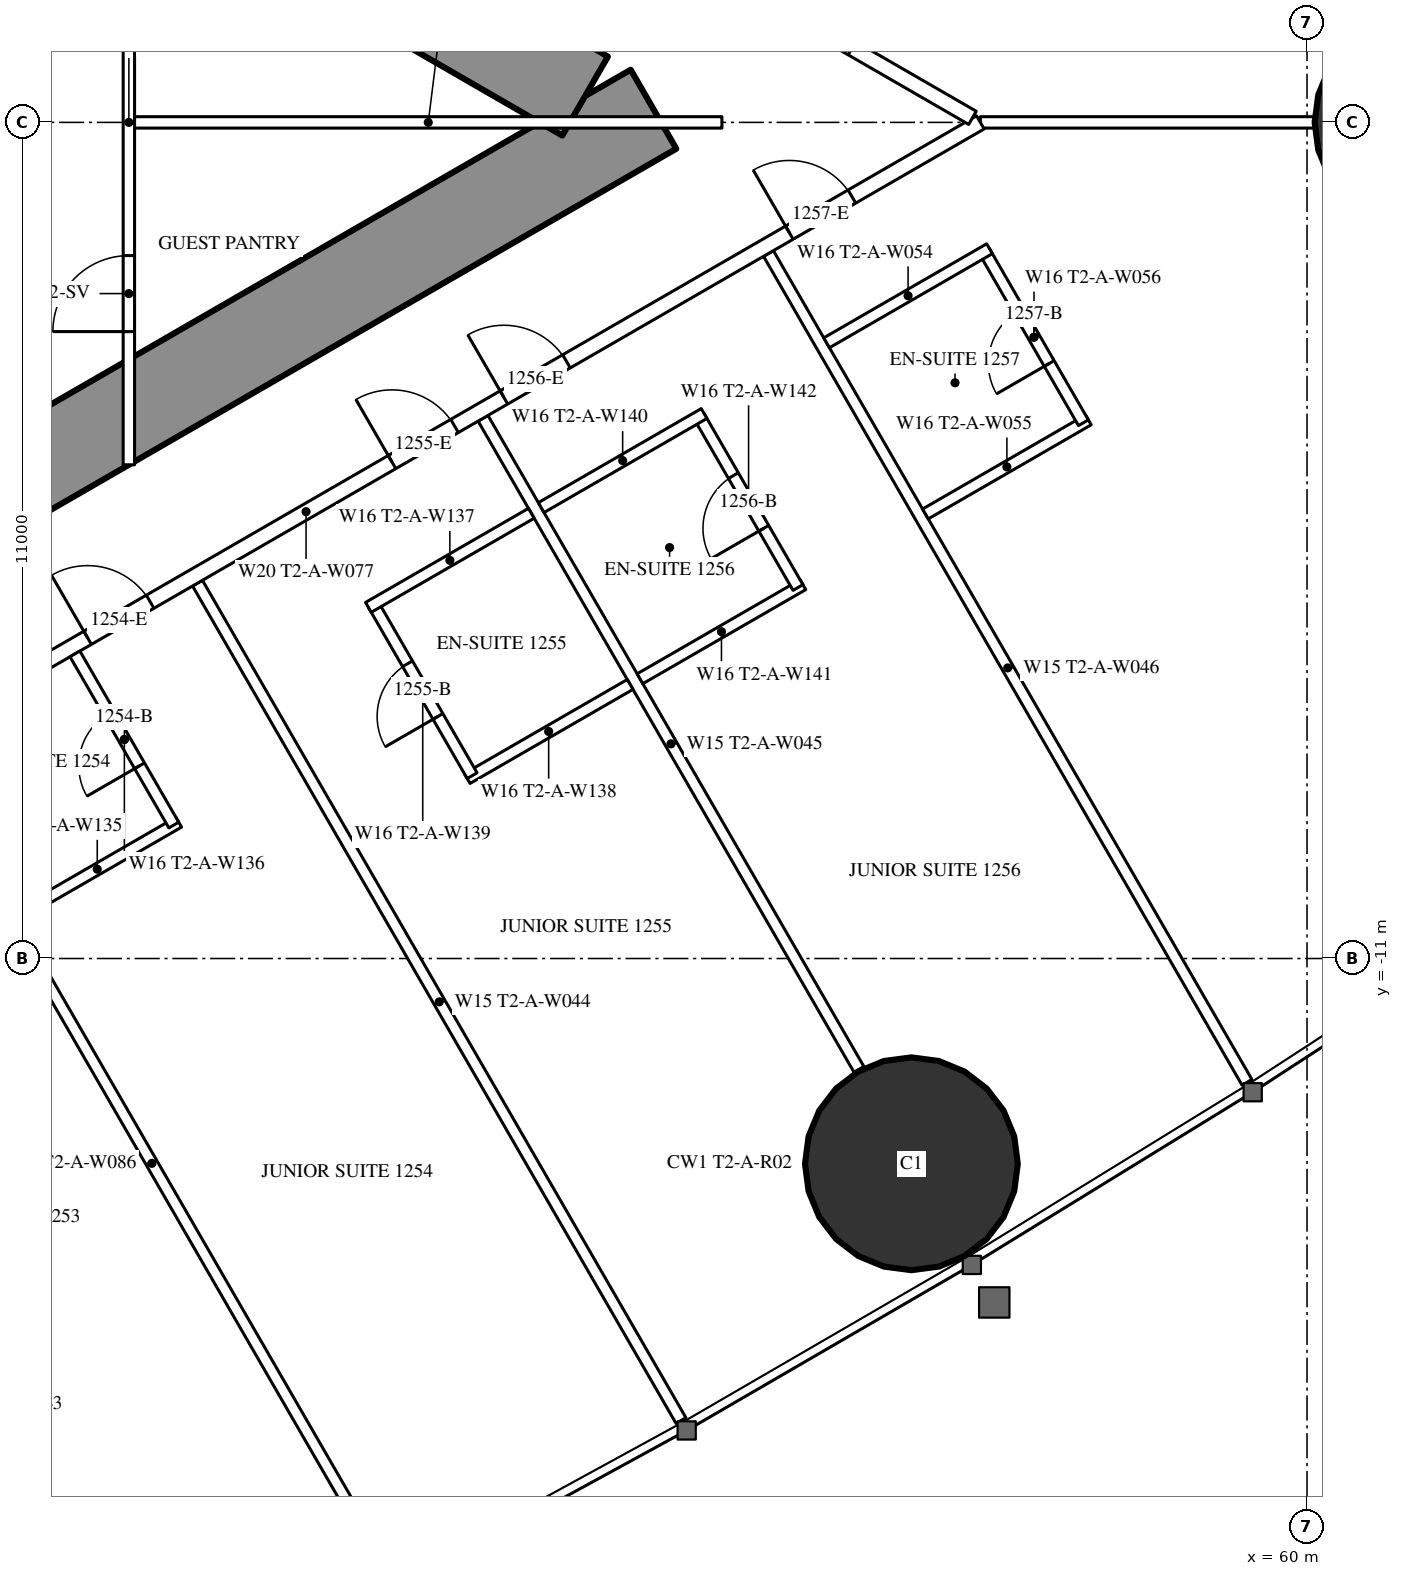
"""IFC4 building model, lengths in metres.
Left out: names, types, materials, properties, quantities, classifications, styles, units other than length and angle.
Written with IfcOpenShell. Run it as: python <this file> out.ifc"""

import sys

from ifc_helpers import new_model, si_unit, direction, frame, frame_2d, origin, origin_2d, place, context, subcontext, project, spatial, rectangle, hollow_circle, extrude, element, fill, save


model = new_model("IFC4")
c1 = context("Model", 3, precision=1e-05, world=origin(), true_north=direction((0.0, 1.0)))
c2 = subcontext(c1, "Body", "Model", "MODEL_VIEW")
j1 = project(units=[si_unit("LENGTHUNIT", "METRE"), si_unit("PLANEANGLEUNIT", "RADIAN")], contexts=[c1])
p1 = place(None, origin())
s1 = spatial("IfcSite", under=j1, at=p1, CompositionType="ELEMENT")
p2 = place(p1, origin())
s2 = spatial("IfcBuilding", under=s1, at=p2, CompositionType="ELEMENT")
p3 = place(p2, frame((0.0, 0.0, 49.5)))
s3 = spatial("IfcBuildingStorey", under=s2, at=p3, CompositionType="ELEMENT", Elevation=49.5)
p4 = place(p3, frame((54.795, -13.701, 0.0), z_axis=(0.0, 0.0, 1.0), x_axis=(1.0, 0.0, 0.0)))
e1 = element("IfcColumn", 1, at=p4, inside=s3, PredefinedType="COLUMN", context=c2, shape_type="SweptSolid", body=[
    extrude(hollow_circle(Radius=1.4, WallThickness=0.12, at=origin_2d()), origin(), (0.0, 0.0, 1.0), 3.5),
])
p5 = place(p3, frame((61.5, 0.0, 0.0), z_axis=(0.0, 0.0, 1.0), x_axis=(1.0, 0.0, 0.0)))
e2 = element("IfcColumn", 2, at=p5, inside=s3, PredefinedType="COLUMN", context=c2, shape_type="SweptSolid", body=[
    extrude(hollow_circle(Radius=1.4, WallThickness=0.1, at=origin_2d()), origin(), (0.0, 0.0, 1.0), 3.5),
])
p6 = place(p3, frame((27.2, -13.8, 0.0), z_axis=(0.0, 0.0, 1.0), x_axis=(0.866027159892, 0.499996958321, 0.0)))
e3 = element("IfcWall", 3, at=p6, inside=s3, PredefinedType="SHEAR", context=c2, shape_type="SweptSolid", body=[
    extrude(rectangle(XDim=27.947, YDim=1.2, at=frame_2d((13.973, 0.0))), origin(), (0.0, 0.0, 1.0), 3.5),
])
p7 = place(p6, frame((4.6, 0.0, 0.0)))
e4 = element("IfcOpeningElement", 4, at=p7, cuts=e3, PredefinedType="OPENING", context=c2, shape_type="SweptSolid", body=[
    extrude(rectangle(XDim=1.0, YDim=2.2, at=frame_2d((0.5, 1.1))), frame((0.0, 0.61, 0.0), z_axis=(0.0, -1.0, 0.0), x_axis=(1.0, 0.0, 0.0)), (0.0, 0.0, 1.0), 1.22),
])
p8 = place(p6, frame((13.395, 0.0, 0.0)))
e5 = element("IfcOpeningElement", 5, at=p8, cuts=e3, PredefinedType="OPENING", context=c2, shape_type="SweptSolid", body=[
    extrude(rectangle(XDim=1.8, YDim=2.2, at=frame_2d((0.9, 1.1))), frame((0.0, 0.61, 0.0), z_axis=(0.0, -1.0, 0.0), x_axis=(1.0, 0.0, 0.0)), (0.0, 0.0, 1.0), 1.22),
])
p9 = place(p3, frame((27.2, 13.8, 0.0), z_axis=(0.0, 0.0, 1.0), x_axis=(0.866024515034, -0.500001539357, 0.0)))
e6 = element("IfcWall", 6, at=p9, inside=s3, PredefinedType="SHEAR", context=c2, shape_type="SweptSolid", body=[
    extrude(rectangle(XDim=26.907, YDim=1.2, at=frame_2d((13.454, 0.0))), origin(), (0.0, 0.0, 1.0), 3.5),
])
p10 = place(p9, frame((4.6, 0.0, 0.0)))
e7 = element("IfcOpeningElement", 7, at=p10, cuts=e6, PredefinedType="OPENING", context=c2, shape_type="SweptSolid", body=[
    extrude(rectangle(XDim=1.0, YDim=2.2, at=frame_2d((0.5, 1.1))), frame((0.0, 0.61, 0.0), z_axis=(0.0, -1.0, 0.0), x_axis=(1.0, 0.0, 0.0)), (0.0, 0.0, 1.0), 1.22),
])
p11 = place(p9, frame((13.395, 0.0, 0.0)))
e8 = element("IfcOpeningElement", 8, at=p11, cuts=e6, PredefinedType="OPENING", context=c2, shape_type="SweptSolid", body=[
    extrude(rectangle(XDim=1.8, YDim=2.2, at=frame_2d((0.9, 1.1))), frame((0.0, 0.61, 0.0), z_axis=(0.0, -1.0, 0.0), x_axis=(1.0, 0.0, 0.0)), (0.0, 0.0, 1.0), 1.22),
])
p12 = place(p3, frame((41.647, -8.23, 0.0), z_axis=(0.0, 0.0, 1.0), x_axis=(0.49998590462, -0.866033541603, 0.0)))
e9 = element("IfcWall", 9, at=p12, inside=s3, PredefinedType="PARTITIONING", context=c2, shape_type="SweptSolid", body=[
    extrude(rectangle(XDim=12.621, YDim=0.15, at=frame_2d((6.311, 0.0))), origin(), (0.0, 0.0, 1.0), 3.25),
])
p13 = place(p3, frame((45.403, -6.062, 0.0), z_axis=(0.0, 0.0, 1.0), x_axis=(0.500007077968, -0.866021317279, 0.0)))
e10 = element("IfcWall", 10, at=p13, inside=s3, PredefinedType="PARTITIONING", context=c2, shape_type="SweptSolid", body=[
    extrude(rectangle(XDim=12.721, YDim=0.15, at=frame_2d((6.361, 0.0))), origin(), (0.0, 0.0, 1.0), 3.25),
])
p14 = place(p3, frame((49.159, -3.893, 0.0), z_axis=(0.0, 0.0, 1.0), x_axis=(0.499998773722, -0.866026111775, 0.0)))
e11 = element("IfcWall", 11, at=p14, inside=s3, PredefinedType="PARTITIONING", context=c2, shape_type="SweptSolid", body=[
    extrude(rectangle(XDim=9.892, YDim=0.15, at=frame_2d((4.946, 0.0))), origin(), (0.0, 0.0, 1.0), 2.25),
])
p15 = place(p3, frame((52.915, -1.725, 0.0), z_axis=(0.0, 0.0, 1.0), x_axis=(0.499997163113, -0.866027041656, 0.0)))
e12 = element("IfcWall", 12, at=p15, inside=s3, PredefinedType="PARTITIONING", context=c2, shape_type="SweptSolid", body=[
    extrude(rectangle(XDim=12.591, YDim=0.15, at=frame_2d((6.295, 0.0))), origin(), (0.0, 0.0, 1.0), 3.25),
])
p16 = place(p3, frame((55.702, 0.0, 0.0), z_axis=(0.0, 0.0, 1.0), x_axis=(1.0, 0.0, 0.0)))
e13 = element("IfcWall", 13, at=p16, inside=s3, PredefinedType="PARTITIONING", context=c2, shape_type="SweptSolid", body=[
    extrude(rectangle(XDim=16.117, YDim=0.15, at=frame_2d((8.059, 0.0))), origin(), (0.0, 0.0, 1.0), 2.25),
])
p17 = place(p3, frame((37.96, -10.243, 0.0), z_axis=(0.0, 0.0, 1.0), x_axis=(0.866026429433, 0.499998223521, 0.0)))
e14 = element("IfcWall", 14, at=p17, inside=s3, PredefinedType="PARTITIONING", context=c2, shape_type="SweptSolid", body=[
    extrude(rectangle(XDim=20.487, YDim=0.2, at=frame_2d((10.243, 0.0))), origin(), (0.0, 0.0, 1.0), 3.25),
])
p18 = place(p17, frame((6.925, 0.0, 0.0)))
e15 = element("IfcOpeningElement", 15, at=p18, cuts=e14, PredefinedType="OPENING", context=c2, shape_type="SweptSolid", body=[
    extrude(rectangle(XDim=0.95, YDim=2.2, at=frame_2d((0.475, 1.1))), frame((0.0, 0.11, 0.0), z_axis=(0.0, -1.0, 0.0), x_axis=(1.0, 0.0, 0.0)), (0.0, 0.0, 1.0), 0.22),
])
p19 = place(p17, frame((11.549, 0.0, 0.0)))
e16 = element("IfcOpeningElement", 16, at=p19, cuts=e14, PredefinedType="OPENING", context=c2, shape_type="SweptSolid", body=[
    extrude(rectangle(XDim=0.95, YDim=2.2, at=frame_2d((0.475, 1.1))), frame((0.0, 0.11, 0.0), z_axis=(0.0, -1.0, 0.0), x_axis=(1.0, 0.0, 0.0)), (0.0, 0.0, 1.0), 0.22),
])
p20 = place(p17, frame((13.249, 0.0, 0.0)))
e17 = element("IfcOpeningElement", 17, at=p20, cuts=e14, PredefinedType="OPENING", context=c2, shape_type="SweptSolid", body=[
    extrude(rectangle(XDim=0.95, YDim=2.2, at=frame_2d((0.475, 1.1))), frame((0.0, 0.11, 0.0), z_axis=(0.0, -1.0, 0.0), x_axis=(1.0, 0.0, 0.0)), (0.0, 0.0, 1.0), 0.22),
])
p21 = place(p17, frame((17.585, 0.0, 0.0)))
e18 = element("IfcOpeningElement", 18, at=p21, cuts=e14, PredefinedType="OPENING", context=c2, shape_type="SweptSolid", body=[
    extrude(rectangle(XDim=0.95, YDim=2.2, at=frame_2d((0.475, 1.1))), frame((0.0, 0.11, 0.0), z_axis=(0.0, -1.0, 0.0), x_axis=(1.0, 0.0, 0.0)), (0.0, 0.0, 1.0), 0.22),
])
p22 = place(p17, frame((0.6, 0.0, 0.0)))
e19 = element("IfcOpeningElement", 19, at=p22, cuts=e14, PredefinedType="OPENING", context=c2, shape_type="SweptSolid", body=[
    extrude(rectangle(XDim=0.95, YDim=2.2, at=frame_2d((0.475, 1.1))), frame((0.0, 0.11, 0.0), z_axis=(0.0, -1.0, 0.0), x_axis=(1.0, 0.0, 0.0)), (0.0, 0.0, 1.0), 0.22),
])
p23 = place(p3, frame((45.375, 5.963, 0.0), z_axis=(0.0, 0.0, 1.0), x_axis=(0.86603164725, -0.499989185844, 0.0)))
e20 = element("IfcWall", 20, at=p23, inside=s3, PredefinedType="PARTITIONING", context=c2, shape_type="SweptSolid", body=[
    extrude(rectangle(XDim=11.805, YDim=0.2, at=frame_2d((5.903, 0.0))), origin(), (0.0, 0.0, 1.0), 3.25),
])
p24 = place(p23, frame((9.024, 0.0, 0.0)))
e21 = element("IfcOpeningElement", 21, at=p24, cuts=e20, PredefinedType="OPENING", context=c2, shape_type="SweptSolid", body=[
    extrude(rectangle(XDim=0.95, YDim=2.2, at=frame_2d((0.475, 1.1))), frame((0.0, 0.11, 0.0), z_axis=(0.0, -1.0, 0.0), x_axis=(1.0, 0.0, 0.0)), (0.0, 0.0, 1.0), 0.22),
])
p25 = place(p23, frame((7.324, 0.0, 0.0)))
e22 = element("IfcOpeningElement", 22, at=p25, cuts=e20, PredefinedType="OPENING", context=c2, shape_type="SweptSolid", body=[
    extrude(rectangle(XDim=0.95, YDim=2.2, at=frame_2d((0.475, 1.1))), frame((0.0, 0.11, 0.0), z_axis=(0.0, -1.0, 0.0), x_axis=(1.0, 0.0, 0.0)), (0.0, 0.0, 1.0), 0.22),
])
p26 = place(p3, frame((43.012, -10.444, 0.0), z_axis=(0.0, 0.0, 1.0), x_axis=(0.866031185235, 0.4999899861, 0.0)))
e23 = element("IfcWall", 23, at=p26, inside=s3, PredefinedType="PARTITIONING", context=c2, shape_type="SweptSolid", body=[
    extrude(rectangle(XDim=2.475, YDim=0.15, at=frame_2d((1.238, 0.0))), origin(), (0.0, 0.0, 1.0), 3.25),
])
p27 = place(p3, frame((43.791, -6.993, 0.0), z_axis=(0.0, 0.0, 1.0), x_axis=(0.500047596559, -0.865997922154, 0.0)))
e24 = element("IfcWall", 24, at=p27, inside=s3, PredefinedType="PARTITIONING", context=c2, shape_type="SweptSolid", body=[
    extrude(rectangle(XDim=2.6, YDim=0.15, at=frame_2d((1.3, 0.0))), origin(), (0.0, 0.0, 1.0), 3.25),
])
p28 = place(p27, frame((0.9, 0.0, 0.0)))
e25 = element("IfcOpeningElement", 25, at=p28, cuts=e24, PredefinedType="OPENING", context=c2, shape_type="SweptSolid", body=[
    extrude(rectangle(XDim=0.8, YDim=2.2, at=frame_2d((0.4, 1.1))), frame((0.0, 0.085, 0.0), z_axis=(0.0, -1.0, 0.0), x_axis=(1.0, 0.0, 0.0)), (0.0, 0.0, 1.0), 0.17),
])
p29 = place(p3, frame((48.951, -8.632, 0.0), z_axis=(0.0, 0.0, 1.0), x_axis=(0.866006523861, 0.500032699561, 0.0)))
e26 = element("IfcWall", 26, at=p29, inside=s3, PredefinedType="PARTITIONING", context=c2, shape_type="SweptSolid", body=[
    extrude(rectangle(XDim=2.475, YDim=0.15, at=frame_2d((1.237, 0.0))), origin(), (0.0, 0.0, 1.0), 3.25),
])
p30 = place(p3, frame((47.716, -6.343, 0.0), z_axis=(0.0, 0.0, 1.0), x_axis=(0.500006934395, -0.866021400173, 0.0)))
e27 = element("IfcWall", 27, at=p30, inside=s3, PredefinedType="PARTITIONING", context=c2, shape_type="SweptSolid", body=[
    extrude(rectangle(XDim=2.6, YDim=0.15, at=frame_2d((1.3, 0.0))), origin(), (0.0, 0.0, 1.0), 3.25),
])
p31 = place(p30, frame((0.9, 0.0, 0.0)))
e28 = element("IfcOpeningElement", 28, at=p31, cuts=e27, PredefinedType="OPENING", context=c2, shape_type="SweptSolid", body=[
    extrude(rectangle(XDim=0.8, YDim=2.2, at=frame_2d((0.4, 1.1))), frame((0.0, 0.085, 0.0), z_axis=(0.0, -1.0, 0.0), x_axis=(1.0, 0.0, 0.0)), (0.0, 0.0, 1.0), 0.17),
])
for number, where, z_axis, x_axis in (
    (29, (47.651, -6.38, 0.0), (0.0, 0.0, 1.0), (0.866, 0.5, 0.0)),
    (30, (51.224, -7.32, 0.0), (0.0, 0.0, 1.0), (0.866, 0.5, 0.0)),
):
    element("IfcWall", number, at=place(p3, frame(where, z_axis=z_axis, x_axis=x_axis)), inside=s3, PredefinedType="PARTITIONING", context=c2, shape_type="SweptSolid", body=[
        extrude(rectangle(XDim=2.475, YDim=0.15, at=frame_2d((1.238, 0.0))), origin(), (0.0, 0.0, 1.0), 3.25),
    ])
p32 = place(p3, frame((52.003, -3.868, 0.0), z_axis=(0.0, 0.0, 1.0), x_axis=(0.500047596559, -0.865997922154, 0.0)))
e31 = element("IfcWall", 31, at=p32, inside=s3, PredefinedType="PARTITIONING", context=c2, shape_type="SweptSolid", body=[
    extrude(rectangle(XDim=2.6, YDim=0.15, at=frame_2d((1.3, 0.0))), origin(), (0.0, 0.0, 1.0), 3.25),
])
p33 = place(p32, frame((0.9, 0.0, 0.0)))
e32 = element("IfcOpeningElement", 32, at=p33, cuts=e31, PredefinedType="OPENING", context=c2, shape_type="SweptSolid", body=[
    extrude(rectangle(XDim=0.8, YDim=2.2, at=frame_2d((0.4, 1.1))), frame((0.0, 0.085, 0.0), z_axis=(0.0, -1.0, 0.0), x_axis=(1.0, 0.0, 0.0)), (0.0, 0.0, 1.0), 0.17),
])
for number, where, z_axis, x_axis in (
    (33, (49.925, -5.068, 0.0), (0.0, 0.0, 1.0), (0.866, 0.5, 0.0)),
    (34, (54.98, -5.151, 0.0), (0.0, 0.0, 1.0), (0.866, 0.5, 0.0)),
):
    element("IfcWall", number, at=place(p3, frame(where, z_axis=z_axis, x_axis=x_axis)), inside=s3, PredefinedType="PARTITIONING", context=c2, shape_type="SweptSolid", body=[
        extrude(rectangle(XDim=2.475, YDim=0.15, at=frame_2d((1.237, 0.0))), origin(), (0.0, 0.0, 1.0), 3.25),
    ])
p34 = place(p3, frame((55.758, -1.7, 0.0), z_axis=(0.0, 0.0, 1.0), x_axis=(0.500006934395, -0.866021400173, 0.0)))
e35 = element("IfcWall", 35, at=p34, inside=s3, PredefinedType="PARTITIONING", context=c2, shape_type="SweptSolid", body=[
    extrude(rectangle(XDim=2.6, YDim=0.15, at=frame_2d((1.3, 0.0))), origin(), (0.0, 0.0, 1.0), 3.25),
])
p35 = place(p34, frame((0.9, 0.0, 0.0)))
e36 = element("IfcOpeningElement", 36, at=p35, cuts=e35, PredefinedType="OPENING", context=c2, shape_type="SweptSolid", body=[
    extrude(rectangle(XDim=0.8, YDim=2.2, at=frame_2d((0.4, 1.1))), frame((0.0, 0.085, 0.0), z_axis=(0.0, -1.0, 0.0), x_axis=(1.0, 0.0, 0.0)), (0.0, 0.0, 1.0), 0.17),
])
p36 = place(p3, frame((53.68, -2.9, 0.0), z_axis=(0.0, 0.0, 1.0), x_axis=(0.866006523861, 0.500032699561, 0.0)))
e37 = element("IfcWall", 37, at=p36, inside=s3, PredefinedType="PARTITIONING", context=c2, shape_type="SweptSolid", body=[
    extrude(rectangle(XDim=2.475, YDim=0.15, at=frame_2d((1.237, 0.0))), origin(), (0.0, 0.0, 1.0), 3.25),
])
p37 = place(p3, frame((44.5, -4.505, 0.0), z_axis=(0.0, 0.0, 1.0), x_axis=(0.0, 1.0, 0.0)))
e38 = element("IfcWall", 38, at=p37, inside=s3, PredefinedType="PARTITIONING", context=c2, shape_type="SweptSolid", body=[
    extrude(rectangle(XDim=9.009, YDim=0.15, at=frame_2d((4.505, 0.0))), origin(), (0.0, 0.0, 1.0), 2.45),
])
p38 = place(p37, frame((1.752, 0.0, 0.0)))
e39 = element("IfcOpeningElement", 39, at=p38, cuts=e38, PredefinedType="OPENING", context=c2, shape_type="SweptSolid", body=[
    extrude(rectangle(XDim=1.0, YDim=2.2, at=frame_2d((0.5, 1.1))), frame((0.0, 0.085, 0.0), z_axis=(0.0, -1.0, 0.0), x_axis=(1.0, 0.0, 0.0)), (0.0, 0.0, 1.0), 0.17),
])
p39 = place(p37, frame((6.257, 0.0, 0.0)))
e40 = element("IfcOpeningElement", 40, at=p39, cuts=e38, PredefinedType="OPENING", context=c2, shape_type="SweptSolid", body=[
    extrude(rectangle(XDim=1.0, YDim=2.2, at=frame_2d((0.5, 1.1))), frame((0.0, 0.085, 0.0), z_axis=(0.0, -1.0, 0.0), x_axis=(1.0, 0.0, 0.0)), (0.0, 0.0, 1.0), 0.17),
])
p40 = place(p3, frame((44.575, 0.0, 0.0), z_axis=(0.0, 0.0, 1.0), x_axis=(1.0, 0.0, 0.0)))
e41 = element("IfcWall", 41, at=p40, inside=s3, PredefinedType="PARTITIONING", context=c2, shape_type="SweptSolid", body=[
    extrude(rectangle(XDim=7.727, YDim=0.15, at=frame_2d((3.864, 0.0))), origin(), (0.0, 0.0, 1.0), 2.25),
])
p41 = place(p28, origin())
e42 = element("IfcDoor", 42, at=p41, inside=s3, OperationType="SINGLE_SWING_RIGHT", PredefinedType="DOOR", context=c2, shape_type="SweptSolid", body=[
    extrude(rectangle(XDim=0.8, YDim=2.2, at=frame_2d((0.4, 1.1))), frame((0.0, 0.025, 0.0), z_axis=(0.0, -1.0, 0.0), x_axis=(1.0, 0.0, 0.0)), (0.0, 0.0, 1.0), 0.05),
])
fill(e25, e42)
p42 = place(p18, origin())
e43 = element("IfcDoor", 43, at=p42, inside=s3, OperationType="SINGLE_SWING_LEFT", PredefinedType="DOOR", context=c2, shape_type="SweptSolid", body=[
    extrude(rectangle(XDim=0.95, YDim=2.2, at=frame_2d((0.475, 1.1))), frame((0.0, 0.025, 0.0), z_axis=(0.0, -1.0, 0.0), x_axis=(1.0, 0.0, 0.0)), (0.0, 0.0, 1.0), 0.05),
])
fill(e15, e43)
p43 = place(p31, origin())
e44 = element("IfcDoor", 44, at=p43, inside=s3, OperationType="SINGLE_SWING_RIGHT", PredefinedType="DOOR", context=c2, shape_type="SweptSolid", body=[
    extrude(rectangle(XDim=0.8, YDim=2.2, at=frame_2d((0.4, 1.1))), frame((0.0, 0.025, 0.0), z_axis=(0.0, -1.0, 0.0), x_axis=(1.0, 0.0, 0.0)), (0.0, 0.0, 1.0), 0.05),
])
fill(e28, e44)
p44 = place(p19, origin())
e45 = element("IfcDoor", 45, at=p44, inside=s3, OperationType="SINGLE_SWING_LEFT", PredefinedType="DOOR", context=c2, shape_type="SweptSolid", body=[
    extrude(rectangle(XDim=0.95, YDim=2.2, at=frame_2d((0.475, 1.1))), frame((0.0, 0.025, 0.0), z_axis=(0.0, -1.0, 0.0), x_axis=(1.0, 0.0, 0.0)), (0.0, 0.0, 1.0), 0.05),
])
fill(e16, e45)
p45 = place(p33, origin())
e46 = element("IfcDoor", 46, at=p45, inside=s3, OperationType="SINGLE_SWING_RIGHT", PredefinedType="DOOR", context=c2, shape_type="SweptSolid", body=[
    extrude(rectangle(XDim=0.8, YDim=2.2, at=frame_2d((0.4, 1.1))), frame((0.0, 0.025, 0.0), z_axis=(0.0, -1.0, 0.0), x_axis=(1.0, 0.0, 0.0)), (0.0, 0.0, 1.0), 0.05),
])
fill(e32, e46)
p46 = place(p20, origin())
e47 = element("IfcDoor", 47, at=p46, inside=s3, OperationType="SINGLE_SWING_LEFT", PredefinedType="DOOR", context=c2, shape_type="SweptSolid", body=[
    extrude(rectangle(XDim=0.95, YDim=2.2, at=frame_2d((0.475, 1.1))), frame((0.0, 0.025, 0.0), z_axis=(0.0, -1.0, 0.0), x_axis=(1.0, 0.0, 0.0)), (0.0, 0.0, 1.0), 0.05),
])
fill(e17, e47)
p47 = place(p35, origin())
e48 = element("IfcDoor", 48, at=p47, inside=s3, OperationType="SINGLE_SWING_RIGHT", PredefinedType="DOOR", context=c2, shape_type="SweptSolid", body=[
    extrude(rectangle(XDim=0.8, YDim=2.2, at=frame_2d((0.4, 1.1))), frame((0.0, 0.025, 0.0), z_axis=(0.0, -1.0, 0.0), x_axis=(1.0, 0.0, 0.0)), (0.0, 0.0, 1.0), 0.05),
])
fill(e36, e48)
p48 = place(p21, origin())
e49 = element("IfcDoor", 49, at=p48, inside=s3, OperationType="SINGLE_SWING_LEFT", PredefinedType="DOOR", context=c2, shape_type="SweptSolid", body=[
    extrude(rectangle(XDim=0.95, YDim=2.2, at=frame_2d((0.475, 1.1))), frame((0.0, 0.025, 0.0), z_axis=(0.0, -1.0, 0.0), x_axis=(1.0, 0.0, 0.0)), (0.0, 0.0, 1.0), 0.05),
])
fill(e18, e49)
p49 = place(p38, origin())
e50 = element("IfcDoor", 50, at=p49, inside=s3, OperationType="SINGLE_SWING_LEFT", PredefinedType="DOOR", context=c2, shape_type="SweptSolid", body=[
    extrude(rectangle(XDim=1.0, YDim=2.2, at=frame_2d((0.5, 1.1))), frame((0.0, 0.025, 0.0), z_axis=(0.0, -1.0, 0.0), x_axis=(1.0, 0.0, 0.0)), (0.0, 0.0, 1.0), 0.05),
])
fill(e39, e50)
save(model, sys.argv[1])
